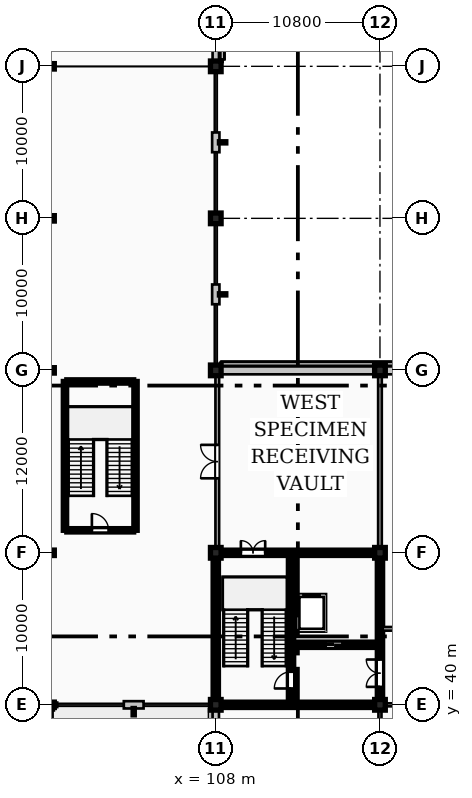
"""IFC4 building model, lengths in metres.
Left out: names, types, materials, properties, quantities, classifications, styles, units other than length and angle.
Written with IfcOpenShell. Run it as: python <this file> out.ifc"""

import sys

from ifc_helpers import new_model, si_unit, direction, frame, frame_2d, origin, origin_2d, place, context, subcontext, project, spatial, rectangle, hollow_circle, extrude, element, fill, save


model = new_model("IFC4")
c1 = context("Model", 3, precision=1e-05, world=origin(), true_north=direction((0.0, 1.0)))
c2 = subcontext(c1, "Body", "Model", "MODEL_VIEW")
j1 = project(units=[si_unit("LENGTHUNIT", "METRE"), si_unit("PLANEANGLEUNIT", "RADIAN")], contexts=[c1])
p1 = place(None, origin())
s1 = spatial("IfcSite", under=j1, at=p1, CompositionType="ELEMENT")
p2 = place(p1, origin())
s2 = spatial("IfcBuilding", under=s1, at=p2, CompositionType="ELEMENT")
p3 = place(p2, origin())
s3 = spatial("IfcBuildingStorey", under=s2, at=p3, CompositionType="ELEMENT", Elevation=0.0)
for number, where, z_axis, x_axis in (
    (1, (97.2, 40.0, 0.0), (0.0, 0.0, 1.0), (1.0, 0.0, 0.0)),
    (2, (97.2, 50.0, 0.0), (0.0, 0.0, 1.0), (1.0, 0.0, 0.0)),
    (3, (97.2, 62.0, 0.0), (0.0, 0.0, 1.0), (1.0, 0.0, 0.0)),
    (4, (97.2, 72.0, 0.0), (0.0, 0.0, 1.0), (1.0, 0.0, 0.0)),
    (5, (97.2, 82.0, 0.0), (0.0, 0.0, 1.0), (1.0, 0.0, 0.0)),
):
    element("IfcColumn", number, at=place(p3, frame(where, z_axis=z_axis, x_axis=x_axis)), inside=s3, PredefinedType="COLUMN", context=c2, shape_type="SweptSolid", body=[
        extrude(hollow_circle(Radius=0.178, WallThickness=0.016, at=origin_2d()), origin(), (0.0, 0.0, 1.0), 4.8),
    ])
for number, where, z_axis, x_axis in (
    (6, (108.0, 40.0, 0.0), (0.0, 0.0, 1.0), (1.0, 0.0, 0.0)),
    (7, (108.0, 50.0, 0.0), (0.0, 0.0, 1.0), (1.0, 0.0, 0.0)),
    (8, (108.0, 62.0, 0.0), (0.0, 0.0, 1.0), (1.0, 0.0, 0.0)),
    (9, (108.0, 72.0, 0.0), (0.0, 0.0, 1.0), (1.0, 0.0, 0.0)),
    (10, (108.0, 82.0, 0.0), (0.0, 0.0, 1.0), (1.0, 0.0, 0.0)),
    (11, (118.8, 40.0, 0.0), (0.0, 0.0, 1.0), (1.0, 0.0, 0.0)),
    (12, (118.8, 50.0, 0.0), (0.0, 0.0, 1.0), (1.0, 0.0, 0.0)),
    (13, (118.8, 62.0, 0.0), (0.0, 0.0, 1.0), (1.0, 0.0, 0.0)),
):
    element("IfcColumn", number, at=place(p3, frame(where, z_axis=z_axis, x_axis=x_axis)), inside=s3, PredefinedType="COLUMN", context=c2, shape_type="SweptSolid", body=[
        extrude(rectangle(XDim=0.7, YDim=0.7, at=origin_2d()), origin(), (0.0, 0.0, 1.0), 4.8),
    ])
p4 = place(p3, frame((108.35, 62.43, -1.38), z_axis=(0.0, 0.0, 1.0), x_axis=(1.0, 0.0, 0.0)))
e14 = element("IfcWall", 14, at=p4, inside=s3, PredefinedType="PARAPET", context=c2, shape_type="SweptSolid", body=[
    extrude(rectangle(XDim=53.2, YDim=0.26, at=frame_2d((26.6, 0.0))), origin(), (0.0, 0.0, 1.0), 4.58),
])
p5 = place(p3, frame((108.43, 82.45, -1.38), z_axis=(0.0, 0.0, 1.0), x_axis=(0.0, 1.0, 0.0)))
e15 = element("IfcWall", 15, at=p5, inside=s3, PredefinedType="PARAPET", context=c2, shape_type="SweptSolid", body=[
    extrude(rectangle(XDim=29.1, YDim=0.26, at=frame_2d((14.55, 0.0))), origin(), (0.0, 0.0, 1.0), 5.92),
])
p6 = place(p3, frame((97.2, 39.63, 0.0), z_axis=(0.0, 0.0, 1.0), x_axis=(0.0, 1.0, 0.0)))
e16 = element("IfcWall", 16, at=p6, inside=s3, PredefinedType="STANDARD", context=c2, shape_type="SweptSolid", body=[
    extrude(rectangle(XDim=0.225, YDim=0.3, at=frame_2d((0.113, 0.0))), origin(), (0.0, 0.0, 1.0), 4.56),
])
p7 = place(p3, frame((101.95, 40.0, 0.0), z_axis=(0.0, 0.0, 1.0), x_axis=(1.0, 0.0, 0.0)))
e17 = element("IfcWall", 17, at=p7, inside=s3, PredefinedType="STANDARD", context=c2, shape_type="SweptSolid", body=[
    extrude(rectangle(XDim=1.3, YDim=0.48, at=frame_2d((0.65, 0.0))), origin(), (0.0, 0.0, 1.0), 4.009),
])
for number, where, z_axis, x_axis in (
    (18, (97.345, 40.0, 0.0), (0.0, 0.0, 1.0), (1.0, 0.0, 0.0)),
    (19, (107.63, 40.0, 0.0), (0.0, 0.0, 1.0), (1.0, 0.0, 0.0)),
):
    element("IfcWall", number, at=place(p3, frame(where, z_axis=z_axis, x_axis=x_axis)), inside=s3, PredefinedType="STANDARD", context=c2, shape_type="SweptSolid", body=[
        extrude(rectangle(XDim=0.225, YDim=0.3, at=frame_2d((0.113, 0.0))), origin(), (0.0, 0.0, 1.0), 4.56),
    ])
p8 = place(p3, frame((108.0, 39.855, 0.0), z_axis=(0.0, 0.0, 1.0), x_axis=(0.0, -1.0, 0.0)))
e20 = element("IfcWall", 20, at=p8, inside=s3, PredefinedType="STANDARD", context=c2, shape_type="SweptSolid", body=[
    extrude(rectangle(XDim=9.71, YDim=0.42, at=frame_2d((4.855, 0.0))), origin(), (0.0, 0.0, 1.0), 3.97),
])
p9 = place(p8, frame((4.055, 0.0, 1.2)))
e21 = element("IfcOpeningElement", 21, at=p9, cuts=e20, PredefinedType="OPENING", context=c2, shape_type="SweptSolid", body=[
    extrude(rectangle(XDim=1.6, YDim=1.8, at=frame_2d((0.8, 0.9))), frame((0.0, 0.22, 0.0), z_axis=(0.0, -1.0, 0.0), x_axis=(1.0, 0.0, 0.0)), (0.0, 0.0, 1.0), 0.44),
])
for number, where, z_axis, x_axis in (
    (22, (129.455, 62.0, 0.0), (0.0, 0.0, 1.0), (-1.0, 0.0, 0.0)),
    (23, (118.655, 62.0, 0.0), (0.0, 0.0, 1.0), (-1.0, 0.0, 0.0)),
):
    element("IfcWall", number, at=place(p3, frame(where, z_axis=z_axis, x_axis=x_axis)), inside=s3, PredefinedType="SOLIDWALL", context=c2, shape_type="SweptSolid", body=[
        extrude(rectangle(XDim=10.51, YDim=0.52, at=frame_2d((5.255, 0.0))), origin(), (0.0, 0.0, 1.0), 3.819),
    ])
p10 = place(p3, frame((108.0, 66.35, 0.0), z_axis=(0.0, 0.0, 1.0), x_axis=(0.0, 1.0, 0.0)))
e24 = element("IfcWall", 24, at=p10, inside=s3, PredefinedType="STANDARD", context=c2, shape_type="SweptSolid", body=[
    extrude(rectangle(XDim=1.3, YDim=0.48, at=frame_2d((0.65, 0.0))), origin(), (0.0, 0.0, 1.0), 4.56),
])
for number, where, z_axis, x_axis in (
    (25, (108.0, 62.145, 0.0), (0.0, 0.0, 1.0), (0.0, 1.0, 0.0)),
    (26, (108.0, 71.63, 0.0), (0.0, 0.0, 1.0), (0.0, 1.0, 0.0)),
):
    element("IfcWall", number, at=place(p3, frame(where, z_axis=z_axis, x_axis=x_axis)), inside=s3, PredefinedType="STANDARD", context=c2, shape_type="SweptSolid", body=[
        extrude(rectangle(XDim=0.225, YDim=0.3, at=frame_2d((0.113, 0.0))), origin(), (0.0, 0.0, 1.0), 4.56),
    ])
p11 = place(p3, frame((108.0, 76.35, 0.0), z_axis=(0.0, 0.0, 1.0), x_axis=(0.0, 1.0, 0.0)))
e27 = element("IfcWall", 27, at=p11, inside=s3, PredefinedType="STANDARD", context=c2, shape_type="SweptSolid", body=[
    extrude(rectangle(XDim=1.3, YDim=0.48, at=frame_2d((0.65, 0.0))), origin(), (0.0, 0.0, 1.0), 4.56),
])
for number, where, z_axis, x_axis in (
    (28, (108.0, 72.145, 0.0), (0.0, 0.0, 1.0), (0.0, 1.0, 0.0)),
    (29, (108.0, 81.63, 0.0), (0.0, 0.0, 1.0), (0.0, 1.0, 0.0)),
):
    element("IfcWall", number, at=place(p3, frame(where, z_axis=z_axis, x_axis=x_axis)), inside=s3, PredefinedType="STANDARD", context=c2, shape_type="SweptSolid", body=[
        extrude(rectangle(XDim=0.225, YDim=0.3, at=frame_2d((0.113, 0.0))), origin(), (0.0, 0.0, 1.0), 4.56),
    ])
p12 = place(p3, frame((108.0, 82.145, 0.0), z_axis=(0.0, 0.0, 1.0), x_axis=(0.0, 1.0, 0.0)))
e30 = element("IfcWall", 30, at=p12, inside=s3, PredefinedType="STANDARD", context=c2, shape_type="SweptSolid", body=[
    extrude(rectangle(XDim=9.71, YDim=0.42, at=frame_2d((4.855, 0.0))), origin(), (0.0, 0.0, 1.0), 4.009),
])
p13 = place(p12, frame((4.055, 0.0, 1.2)))
e31 = element("IfcOpeningElement", 31, at=p13, cuts=e30, PredefinedType="OPENING", context=c2, shape_type="SweptSolid", body=[
    extrude(rectangle(XDim=1.6, YDim=1.8, at=frame_2d((0.8, 0.9))), frame((0.0, 0.22, 0.0), z_axis=(0.0, -1.0, 0.0), x_axis=(1.0, 0.0, 0.0)), (0.0, 0.0, 1.0), 0.44),
])
p14 = place(p3, frame((108.35, 40.0, 0.0), z_axis=(0.0, 0.0, 1.0), x_axis=(1.0, 0.0, 0.0)))
e32 = element("IfcWall", 32, at=p14, inside=s3, PredefinedType="SHEAR", context=c2, shape_type="SweptSolid", body=[
    extrude(rectangle(XDim=10.1, YDim=0.35, at=frame_2d((5.05, 0.0))), origin(), (0.0, 0.0, 1.0), 4.56),
])
p15 = place(p3, frame((108.35, 50.0, 0.0), z_axis=(0.0, 0.0, 1.0), x_axis=(1.0, 0.0, 0.0)))
e33 = element("IfcWall", 33, at=p15, inside=s3, PredefinedType="SHEAR", context=c2, shape_type="SweptSolid", body=[
    extrude(rectangle(XDim=10.1, YDim=0.35, at=frame_2d((5.05, 0.0))), origin(), (0.0, 0.0, 1.0), 4.56),
])
p16 = place(p15, frame((1.3, 0.0, 0.0)))
e34 = element("IfcOpeningElement", 34, at=p16, cuts=e33, PredefinedType="OPENING", context=c2, shape_type="SweptSolid", body=[
    extrude(rectangle(XDim=1.6, YDim=2.2, at=frame_2d((0.8, 1.1))), frame((0.0, 0.185, 0.0), z_axis=(0.0, -1.0, 0.0), x_axis=(1.0, 0.0, 0.0)), (0.0, 0.0, 1.0), 0.37),
])
p17 = place(p3, frame((108.0, 40.35, 0.0), z_axis=(0.0, 0.0, 1.0), x_axis=(0.0, 1.0, 0.0)))
e35 = element("IfcWall", 35, at=p17, inside=s3, PredefinedType="SHEAR", context=c2, shape_type="SweptSolid", body=[
    extrude(rectangle(XDim=9.3, YDim=0.35, at=frame_2d((4.65, 0.0))), origin(), (0.0, 0.0, 1.0), 4.56),
])
p18 = place(p3, frame((118.8, 40.35, 0.0), z_axis=(0.0, 0.0, 1.0), x_axis=(0.0, 1.0, 0.0)))
e36 = element("IfcWall", 36, at=p18, inside=s3, PredefinedType="SHEAR", context=c2, shape_type="SweptSolid", body=[
    extrude(rectangle(XDim=9.3, YDim=0.35, at=frame_2d((4.65, 0.0))), origin(), (0.0, 0.0, 1.0), 4.56),
])
p19 = place(p18, frame((0.83, 0.0, 0.0)))
e37 = element("IfcOpeningElement", 37, at=p19, cuts=e36, PredefinedType="OPENING", context=c2, shape_type="SweptSolid", body=[
    extrude(rectangle(XDim=1.8, YDim=2.25, at=frame_2d((0.9, 1.125))), frame((0.0, 0.185, 0.0), z_axis=(0.0, -1.0, 0.0), x_axis=(1.0, 0.0, 0.0)), (0.0, 0.0, 1.0), 0.37),
])
p20 = place(p3, frame((112.95, 40.175, 0.0), z_axis=(0.0, 0.0, 1.0), x_axis=(0.0, 1.0, 0.0)))
e38 = element("IfcWall", 38, at=p20, inside=s3, PredefinedType="SHEAR", context=c2, shape_type="SweptSolid", body=[
    extrude(rectangle(XDim=9.65, YDim=0.35, at=frame_2d((4.825, 0.0))), origin(), (0.0, 0.0, 1.0), 4.56),
])
p21 = place(p20, frame((0.9, 0.0, 0.0)))
e39 = element("IfcOpeningElement", 39, at=p21, cuts=e38, PredefinedType="OPENING", context=c2, shape_type="SweptSolid", body=[
    extrude(rectangle(XDim=1.1, YDim=2.2, at=frame_2d((0.55, 1.1))), frame((0.0, 0.185, 0.0), z_axis=(0.0, -1.0, 0.0), x_axis=(1.0, 0.0, 0.0)), (0.0, 0.0, 1.0), 0.37),
])
p22 = place(p3, frame((113.13, 43.95, 0.0), z_axis=(0.0, 0.0, 1.0), x_axis=(1.0, 0.0, 0.0)))
e40 = element("IfcWall", 40, at=p22, inside=s3, PredefinedType="SHEAR", context=c2, shape_type="SweptSolid", body=[
    extrude(rectangle(XDim=5.49, YDim=0.35, at=frame_2d((2.745, 0.0))), origin(), (0.0, 0.0, 1.0), 4.56),
])
p23 = place(p22, frame((2.1, 0.0, 0.0)))
e41 = element("IfcOpeningElement", 41, at=p23, cuts=e40, PredefinedType="OPENING", context=c2, shape_type="SweptSolid", body=[
    extrude(rectangle(XDim=1.1, YDim=2.2, at=frame_2d((0.55, 1.1))), frame((0.0, 0.185, 0.0), z_axis=(0.0, -1.0, 0.0), x_axis=(1.0, 0.0, 0.0)), (0.0, 0.0, 1.0), 0.37),
])
for number, where, z_axis, x_axis in (
    (42, (98.08, 51.48, 0.0), (0.0, 0.0, 1.0), (0.0, 1.0, 0.0)),
    (43, (102.72, 51.48, 0.0), (0.0, 0.0, 1.0), (0.0, 1.0, 0.0)),
):
    element("IfcWall", number, at=place(p3, frame(where, z_axis=z_axis, x_axis=x_axis)), inside=s3, PredefinedType="SHEAR", context=c2, shape_type="SweptSolid", body=[
        extrude(rectangle(XDim=9.79, YDim=0.22, at=frame_2d((4.895, 0.0))), origin(), (0.0, 0.0, 1.0), 4.56),
    ])
p24 = place(p3, frame((98.2, 61.27, 0.0), z_axis=(0.0, 0.0, 1.0), x_axis=(1.0, 0.0, 0.0)))
e44 = element("IfcWall", 44, at=p24, inside=s3, PredefinedType="SHEAR", context=c2, shape_type="SweptSolid", body=[
    extrude(rectangle(XDim=4.4, YDim=0.22, at=frame_2d((2.2, 0.0))), origin(), (0.0, 0.0, 1.0), 4.56),
])
p25 = place(p3, frame((98.2, 51.48, 0.0), z_axis=(0.0, 0.0, 1.0), x_axis=(1.0, 0.0, 0.0)))
e45 = element("IfcWall", 45, at=p25, inside=s3, PredefinedType="SHEAR", context=c2, shape_type="SweptSolid", body=[
    extrude(rectangle(XDim=4.4, YDim=0.22, at=frame_2d((2.2, 0.0))), origin(), (0.0, 0.0, 1.0), 4.56),
])
p26 = place(p25, frame((1.65, 0.0, 0.0)))
e46 = element("IfcOpeningElement", 46, at=p26, cuts=e45, PredefinedType="OPENING", context=c2, shape_type="SweptSolid", body=[
    extrude(rectangle(XDim=1.1, YDim=2.2, at=frame_2d((0.55, 1.1))), frame((0.0, 0.12, 0.0), z_axis=(0.0, -1.0, 0.0), x_axis=(1.0, 0.0, 0.0)), (0.0, 0.0, 1.0), 0.24),
])
p27 = place(p3, frame((118.98, 40.0, 0.0), z_axis=(0.0, 0.0, 1.0), x_axis=(1.0, 0.0, 0.0)))
e47 = element("IfcWall", 47, at=p27, inside=s3, PredefinedType="SOLIDWALL", context=c2, shape_type="SweptSolid", body=[
    extrude(rectangle(XDim=10.42, YDim=0.2, at=frame_2d((5.21, 0.0))), origin(), (0.0, 0.0, 1.0), 3.819),
])
p28 = place(p27, frame((4.41, 0.0, 0.0)))
e48 = element("IfcOpeningElement", 48, at=p28, cuts=e47, PredefinedType="OPENING", context=c2, shape_type="SweptSolid", body=[
    extrude(rectangle(XDim=1.6, YDim=2.3, at=frame_2d((0.8, 1.15))), frame((0.0, 0.11, 0.0), z_axis=(0.0, -1.0, 0.0), x_axis=(1.0, 0.0, 0.0)), (0.0, 0.0, 1.0), 0.22),
])
p29 = place(p3, frame((118.98, 45.0, 0.0), z_axis=(0.0, 0.0, 1.0), x_axis=(1.0, 0.0, 0.0)))
e49 = element("IfcWall", 49, at=p29, inside=s3, PredefinedType="SOLIDWALL", context=c2, shape_type="SweptSolid", body=[
    extrude(rectangle(XDim=42.84, YDim=0.24, at=frame_2d((21.42, 0.0))), origin(), (0.0, 0.0, 1.0), 4.52),
])
p30 = place(p29, frame((20.32, 0.0, 0.0)))
e50 = element("IfcOpeningElement", 50, at=p30, cuts=e49, PredefinedType="OPENING", context=c2, shape_type="SweptSolid", body=[
    extrude(rectangle(XDim=2.2, YDim=2.6, at=frame_2d((1.1, 1.3))), frame((0.0, 0.13, 0.0), z_axis=(0.0, -1.0, 0.0), x_axis=(1.0, 0.0, 0.0)), (0.0, 0.0, 1.0), 0.26),
])
p31 = place(p3, frame((108.1, 50.18, 0.0), z_axis=(0.0, 0.0, 1.0), x_axis=(0.0, 1.0, 0.0)))
e51 = element("IfcWall", 51, at=p31, inside=s3, PredefinedType="SOLIDWALL", context=c2, shape_type="SweptSolid", body=[
    extrude(rectangle(XDim=11.64, YDim=0.24, at=frame_2d((5.82, 0.0))), origin(), (0.0, 0.0, 1.0), 3.919),
])
p32 = place(p31, frame((4.72, 0.0, 0.0)))
e52 = element("IfcOpeningElement", 52, at=p32, cuts=e51, PredefinedType="OPENING", context=c2, shape_type="SweptSolid", body=[
    extrude(rectangle(XDim=2.2, YDim=2.6, at=frame_2d((1.1, 1.3))), frame((0.0, 0.13, 0.0), z_axis=(0.0, -1.0, 0.0), x_axis=(1.0, 0.0, 0.0)), (0.0, 0.0, 1.0), 0.26),
])
p33 = place(p3, frame((118.8, 30.2, 0.0), z_axis=(0.0, 0.0, 1.0), x_axis=(0.0, 1.0, 0.0)))
e53 = element("IfcWall", 53, at=p33, inside=s3, PredefinedType="SOLIDWALL", context=c2, shape_type="SweptSolid", body=[
    extrude(rectangle(XDim=9.62, YDim=0.2, at=frame_2d((4.81, 0.0))), origin(), (0.0, 0.0, 1.0), 3.97),
])
p34 = place(p3, frame((118.8, 50.18, 0.0), z_axis=(0.0, 0.0, 1.0), x_axis=(0.0, 1.0, 0.0)))
e54 = element("IfcWall", 54, at=p34, inside=s3, PredefinedType="SOLIDWALL", context=c2, shape_type="SweptSolid", body=[
    extrude(rectangle(XDim=11.64, YDim=0.24, at=frame_2d((5.82, 0.0))), origin(), (0.0, 0.0, 1.0), 3.919),
])
p35 = place(p21, origin())
e55 = element("IfcDoor", 55, at=p35, inside=s3, OperationType="SINGLE_SWING_LEFT", PredefinedType="DOOR", context=c2, shape_type="SweptSolid", body=[
    extrude(rectangle(XDim=1.1, YDim=2.2, at=frame_2d((0.55, 1.1))), frame((0.0, 0.025, 0.0), z_axis=(0.0, -1.0, 0.0), x_axis=(1.0, 0.0, 0.0)), (0.0, 0.0, 1.0), 0.05),
])
fill(e39, e55)
p36 = place(p19, origin())
e56 = element("IfcDoor", 56, at=p36, inside=s3, OperationType="DOUBLE_DOOR_SINGLE_SWING", PredefinedType="DOOR", context=c2, shape_type="SweptSolid", body=[
    extrude(rectangle(XDim=1.8, YDim=2.25, at=frame_2d((0.9, 1.125))), frame((0.0, 0.025, 0.0), z_axis=(0.0, -1.0, 0.0), x_axis=(1.0, 0.0, 0.0)), (0.0, 0.0, 1.0), 0.05),
])
fill(e37, e56)
p37 = place(p16, origin())
e57 = element("IfcDoor", 57, at=p37, inside=s3, OperationType="DOUBLE_DOOR_SINGLE_SWING", PredefinedType="DOOR", context=c2, shape_type="SweptSolid", body=[
    extrude(rectangle(XDim=1.6, YDim=2.2, at=frame_2d((0.8, 1.1))), frame((0.0, 0.025, 0.0), z_axis=(0.0, -1.0, 0.0), x_axis=(1.0, 0.0, 0.0)), (0.0, 0.0, 1.0), 0.05),
])
fill(e34, e57)
p38 = place(p23, origin())
e58 = element("IfcDoor", 58, at=p38, inside=s3, OperationType="DOUBLE_DOOR_SLIDING", PredefinedType="DOOR", context=c2, shape_type="SweptSolid", body=[
    extrude(rectangle(XDim=1.1, YDim=2.2, at=frame_2d((0.55, 1.1))), frame((0.0, 0.025, 0.0), z_axis=(0.0, -1.0, 0.0), x_axis=(1.0, 0.0, 0.0)), (0.0, 0.0, 1.0), 0.05),
])
fill(e41, e58)
p39 = place(p26, origin())
e59 = element("IfcDoor", 59, at=p39, inside=s3, OperationType="SINGLE_SWING_LEFT", PredefinedType="DOOR", context=c2, shape_type="SweptSolid", body=[
    extrude(rectangle(XDim=1.1, YDim=2.2, at=frame_2d((0.55, 1.1))), frame((0.0, 0.025, 0.0), z_axis=(0.0, -1.0, 0.0), x_axis=(1.0, 0.0, 0.0)), (0.0, 0.0, 1.0), 0.05),
])
fill(e46, e59)
p40 = place(p32, origin())
e60 = element("IfcDoor", 60, at=p40, inside=s3, OperationType="DOUBLE_DOOR_SINGLE_SWING", PredefinedType="DOOR", context=c2, shape_type="SweptSolid", body=[
    extrude(rectangle(XDim=2.2, YDim=2.6, at=frame_2d((1.1, 1.3))), frame((0.0, 0.025, 0.0), z_axis=(0.0, -1.0, 0.0), x_axis=(1.0, 0.0, 0.0)), (0.0, 0.0, 1.0), 0.05),
])
fill(e52, e60)
save(model, sys.argv[1])
